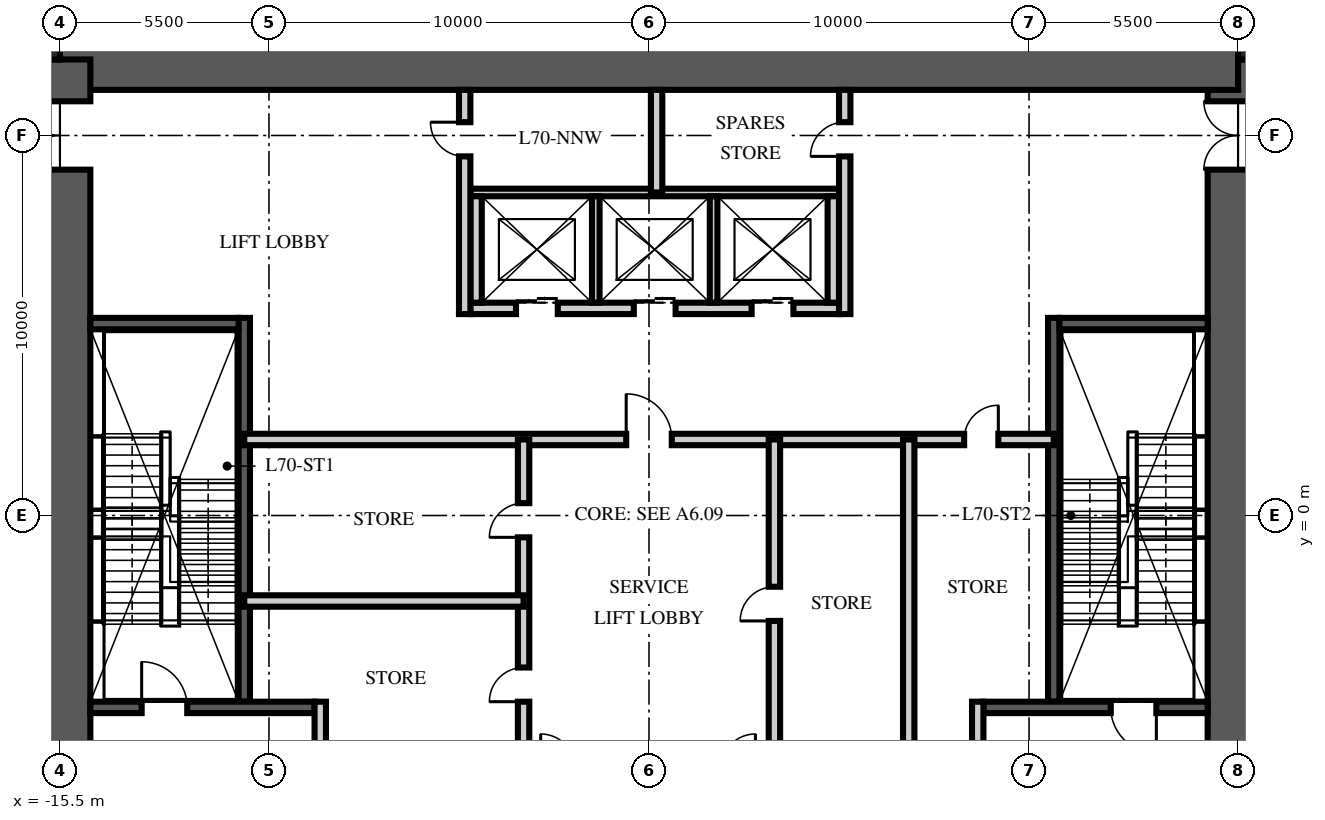
"""IFC4 building model, lengths in metres.
Left out: names, types, materials, properties, quantities, classifications, styles, units other than length and angle.
Written with IfcOpenShell. Run it as: python <this file> out.ifc"""

import sys

from ifc_helpers import new_model, si_unit, direction, frame, frame_2d, origin, origin_2d, place, context, subcontext, project, spatial, rectangle, extrude, element, fill, save


model = new_model("IFC4")
c1 = context("Model", 3, precision=1e-05, world=origin(), true_north=direction((0.0, 1.0)))
c2 = subcontext(c1, "Body", "Model", "MODEL_VIEW")
j1 = project(units=[si_unit("LENGTHUNIT", "METRE"), si_unit("PLANEANGLEUNIT", "RADIAN")], contexts=[c1])
p1 = place(None, origin())
s1 = spatial("IfcSite", under=j1, at=p1, CompositionType="ELEMENT")
p2 = place(p1, origin())
s2 = spatial("IfcBuilding", under=s1, at=p2, CompositionType="ELEMENT")
p3 = place(p2, frame((0.0, 0.0, 278.25)))
s3 = spatial("IfcBuildingStorey", under=s2, at=p3, CompositionType="ELEMENT", Elevation=278.25)
p4 = place(p3, frame((15.5, -12.0, -0.35), z_axis=(0.0, 0.0, 1.0), x_axis=(0.0, 1.0, 0.0)))
e1 = element("IfcWall", 1, at=p4, inside=s3, PredefinedType="SHEAR", context=c2, shape_type="SweptSolid", body=[
    extrude(rectangle(XDim=24.0, YDim=1.6, at=frame_2d((12.0, 0.0))), origin(), (0.0, 0.0, 1.0), 7.6),
])
p5 = place(p4, frame((1.7, 0.0, 0.35)))
e2 = element("IfcOpeningElement", 2, at=p5, cuts=e1, PredefinedType="OPENING", context=c2, shape_type="SweptSolid", body=[
    extrude(rectangle(XDim=1.2, YDim=2.1, at=frame_2d((0.6, 1.05))), frame((0.0, 0.81, 0.0), z_axis=(0.0, -1.0, 0.0), x_axis=(1.0, 0.0, 0.0)), (0.0, 0.0, 1.0), 1.62),
])
p6 = place(p4, frame((21.1, 0.0, 0.35)))
e3 = element("IfcOpeningElement", 3, at=p6, cuts=e1, PredefinedType="OPENING", context=c2, shape_type="SweptSolid", body=[
    extrude(rectangle(XDim=1.8, YDim=2.1, at=frame_2d((0.9, 1.05))), frame((0.0, 0.81, 0.0), z_axis=(0.0, -1.0, 0.0), x_axis=(1.0, 0.0, 0.0)), (0.0, 0.0, 1.0), 1.62),
])
p7 = place(p3, frame((-15.5, 12.0, -0.35), z_axis=(0.0, 0.0, 1.0), x_axis=(1.0, 0.0, 0.0)))
e4 = element("IfcWall", 4, at=p7, inside=s3, PredefinedType="SHEAR", context=c2, shape_type="SweptSolid", body=[
    extrude(rectangle(XDim=31.0, YDim=1.6, at=frame_2d((15.5, 0.0))), origin(), (0.0, 0.0, 1.0), 7.6),
])
p8 = place(p3, frame((-15.5, -12.0, -0.35), z_axis=(0.0, 0.0, 1.0), x_axis=(0.0, 1.0, 0.0)))
e5 = element("IfcWall", 5, at=p8, inside=s3, PredefinedType="SHEAR", context=c2, shape_type="SweptSolid", body=[
    extrude(rectangle(XDim=24.0, YDim=1.6, at=frame_2d((12.0, 0.0))), origin(), (0.0, 0.0, 1.0), 7.6),
])
p9 = place(p8, frame((1.7, 0.0, 0.35)))
e6 = element("IfcOpeningElement", 6, at=p9, cuts=e5, PredefinedType="OPENING", context=c2, shape_type="SweptSolid", body=[
    extrude(rectangle(XDim=1.2, YDim=2.1, at=frame_2d((0.6, 1.05))), frame((0.0, 0.81, 0.0), z_axis=(0.0, -1.0, 0.0), x_axis=(1.0, 0.0, 0.0)), (0.0, 0.0, 1.0), 1.62),
])
p10 = place(p8, frame((21.1, 0.0, 0.35)))
e7 = element("IfcOpeningElement", 7, at=p10, cuts=e5, PredefinedType="OPENING", context=c2, shape_type="SweptSolid", body=[
    extrude(rectangle(XDim=1.8, YDim=2.1, at=frame_2d((0.9, 1.05))), frame((0.0, 0.81, 0.0), z_axis=(0.0, -1.0, 0.0), x_axis=(1.0, 0.0, 0.0)), (0.0, 0.0, 1.0), 1.62),
])
for number, where, z_axis, x_axis in (
    (8, (15.9, 12.4, -0.35), (0.0, 0.0, 1.0), (1.0, 0.0, 0.0)),
    (9, (-15.9, 12.4, -0.35), (0.0, 0.0, 1.0), (1.0, 0.0, 0.0)),
):
    element("IfcColumn", number, at=place(p3, frame(where, z_axis=z_axis, x_axis=x_axis)), inside=s3, PredefinedType="COLUMN", context=c2, shape_type="SweptSolid", body=[
        extrude(rectangle(XDim=0.8, YDim=0.8, at=origin_2d()), origin(), (0.0, 0.0, 1.0), 7.6),
    ])
p11 = place(p3, frame((-10.65, -4.9, 0.0), z_axis=(0.0, 0.0, 1.0), x_axis=(0.0, 1.0, 0.0)))
e10 = element("IfcWall", 10, at=p11, inside=s3, PredefinedType="SOLIDWALL", context=c2, shape_type="SweptSolid", body=[
    extrude(rectangle(XDim=10.1, YDim=0.3, at=frame_2d((5.05, 0.0))), origin(), (0.0, 0.0, 1.0), 7.25),
])
p12 = place(p3, frame((-14.7, -5.05, 0.0), z_axis=(0.0, 0.0, 1.0), x_axis=(1.0, 0.0, 0.0)))
e11 = element("IfcWall", 11, at=p12, inside=s3, PredefinedType="SOLIDWALL", context=c2, shape_type="SweptSolid", body=[
    extrude(rectangle(XDim=5.9, YDim=0.3, at=frame_2d((2.95, 0.0))), origin(), (0.0, 0.0, 1.0), 7.25),
])
p13 = place(p12, frame((1.35, 0.0, 0.0)))
e12 = element("IfcOpeningElement", 12, at=p13, cuts=e11, PredefinedType="OPENING", context=c2, shape_type="SweptSolid", body=[
    extrude(rectangle(XDim=1.2, YDim=2.1, at=frame_2d((0.6, 1.05))), frame((0.0, 0.16, 0.0), z_axis=(0.0, -1.0, 0.0), x_axis=(1.0, 0.0, 0.0)), (0.0, 0.0, 1.0), 0.32),
])
p14 = place(p3, frame((-14.7, 5.05, 0.0), z_axis=(0.0, 0.0, 1.0), x_axis=(1.0, 0.0, 0.0)))
e13 = element("IfcWall", 13, at=p14, inside=s3, PredefinedType="SOLIDWALL", context=c2, shape_type="SweptSolid", body=[
    extrude(rectangle(XDim=3.9, YDim=0.3, at=frame_2d((1.95, 0.0))), origin(), (0.0, 0.0, 1.0), 7.25),
])
p15 = place(p3, frame((-8.65, -11.2, 0.0), z_axis=(0.0, 0.0, 1.0), x_axis=(0.0, 1.0, 0.0)))
e14 = element("IfcWall", 14, at=p15, inside=s3, PredefinedType="PARTITIONING", context=c2, shape_type="SweptSolid", body=[
    extrude(rectangle(XDim=6.3, YDim=0.3, at=frame_2d((3.15, 0.0))), origin(), (0.0, 0.0, 1.0), 7.25),
])
p16 = place(p15, frame((2.45, 0.0, 0.0)))
e15 = element("IfcOpeningElement", 15, at=p16, cuts=e14, PredefinedType="OPENING", context=c2, shape_type="SweptSolid", body=[
    extrude(rectangle(XDim=1.1, YDim=2.1, at=frame_2d((0.55, 1.05))), frame((0.0, 0.16, 0.0), z_axis=(0.0, -1.0, 0.0), x_axis=(1.0, 0.0, 0.0)), (0.0, 0.0, 1.0), 0.32),
])
p17 = place(p3, frame((10.65, -4.9, 0.0), z_axis=(0.0, 0.0, 1.0), x_axis=(0.0, 1.0, 0.0)))
e16 = element("IfcWall", 16, at=p17, inside=s3, PredefinedType="SOLIDWALL", context=c2, shape_type="SweptSolid", body=[
    extrude(rectangle(XDim=10.1, YDim=0.3, at=frame_2d((5.05, 0.0))), origin(), (0.0, 0.0, 1.0), 7.25),
])
p18 = place(p3, frame((14.7, -5.05, 0.0), z_axis=(0.0, 0.0, 1.0), x_axis=(-1.0, 0.0, 0.0)))
e17 = element("IfcWall", 17, at=p18, inside=s3, PredefinedType="SOLIDWALL", context=c2, shape_type="SweptSolid", body=[
    extrude(rectangle(XDim=5.9, YDim=0.3, at=frame_2d((2.95, 0.0))), origin(), (0.0, 0.0, 1.0), 7.25),
])
p19 = place(p18, frame((1.35, 0.0, 0.0)))
e18 = element("IfcOpeningElement", 18, at=p19, cuts=e17, PredefinedType="OPENING", context=c2, shape_type="SweptSolid", body=[
    extrude(rectangle(XDim=1.2, YDim=2.1, at=frame_2d((0.6, 1.05))), frame((0.0, 0.16, 0.0), z_axis=(0.0, -1.0, 0.0), x_axis=(1.0, 0.0, 0.0)), (0.0, 0.0, 1.0), 0.32),
])
p20 = place(p3, frame((14.7, 5.05, 0.0), z_axis=(0.0, 0.0, 1.0), x_axis=(-1.0, 0.0, 0.0)))
e19 = element("IfcWall", 19, at=p20, inside=s3, PredefinedType="SOLIDWALL", context=c2, shape_type="SweptSolid", body=[
    extrude(rectangle(XDim=3.9, YDim=0.3, at=frame_2d((1.95, 0.0))), origin(), (0.0, 0.0, 1.0), 7.25),
])
p21 = place(p3, frame((8.65, -11.2, 0.0), z_axis=(0.0, 0.0, 1.0), x_axis=(0.0, 1.0, 0.0)))
e20 = element("IfcWall", 20, at=p21, inside=s3, PredefinedType="PARTITIONING", context=c2, shape_type="SweptSolid", body=[
    extrude(rectangle(XDim=6.3, YDim=0.3, at=frame_2d((3.15, 0.0))), origin(), (0.0, 0.0, 1.0), 7.25),
])
p22 = place(p21, frame((2.45, 0.0, 0.0)))
e21 = element("IfcOpeningElement", 21, at=p22, cuts=e20, PredefinedType="OPENING", context=c2, shape_type="SweptSolid", body=[
    extrude(rectangle(XDim=1.1, YDim=2.1, at=frame_2d((0.55, 1.05))), frame((0.0, 0.16, 0.0), z_axis=(0.0, -1.0, 0.0), x_axis=(1.0, 0.0, 0.0)), (0.0, 0.0, 1.0), 0.32),
])
p23 = place(p3, frame((-4.7, 5.45, 0.0), z_axis=(0.0, 0.0, 1.0), x_axis=(1.0, 0.0, 0.0)))
e22 = element("IfcWall", 22, at=p23, inside=s3, PredefinedType="PARTITIONING", context=c2, shape_type="SweptSolid", body=[
    extrude(rectangle(XDim=9.7, YDim=0.3, at=frame_2d((4.85, 0.0))), origin(), (0.0, 0.0, 1.0), 7.25),
])
p24 = place(p23, frame((1.2, 0.0, 0.0)))
e23 = element("IfcOpeningElement", 23, at=p24, cuts=e22, PredefinedType="OPENING", context=c2, shape_type="SweptSolid", body=[
    extrude(rectangle(XDim=1.1, YDim=2.1, at=frame_2d((0.55, 1.05))), frame((0.0, 0.16, 0.0), z_axis=(0.0, -1.0, 0.0), x_axis=(1.0, 0.0, 0.0)), (0.0, 0.0, 1.0), 0.32),
])
p25 = place(p23, frame((4.3, 0.0, 0.0)))
e24 = element("IfcOpeningElement", 24, at=p25, cuts=e22, PredefinedType="OPENING", context=c2, shape_type="SweptSolid", body=[
    extrude(rectangle(XDim=1.1, YDim=2.1, at=frame_2d((0.55, 1.05))), frame((0.0, 0.16, 0.0), z_axis=(0.0, -1.0, 0.0), x_axis=(1.0, 0.0, 0.0)), (0.0, 0.0, 1.0), 0.32),
])
p26 = place(p23, frame((7.4, 0.0, 0.0)))
e25 = element("IfcOpeningElement", 25, at=p26, cuts=e22, PredefinedType="OPENING", context=c2, shape_type="SweptSolid", body=[
    extrude(rectangle(XDim=1.1, YDim=2.1, at=frame_2d((0.55, 1.05))), frame((0.0, 0.16, 0.0), z_axis=(0.0, -1.0, 0.0), x_axis=(1.0, 0.0, 0.0)), (0.0, 0.0, 1.0), 0.32),
])
p27 = place(p3, frame((-4.7, 8.5, 0.0), z_axis=(0.0, 0.0, 1.0), x_axis=(1.0, 0.0, 0.0)))
e26 = element("IfcWall", 26, at=p27, inside=s3, PredefinedType="PARTITIONING", context=c2, shape_type="SweptSolid", body=[
    extrude(rectangle(XDim=9.7, YDim=0.2, at=frame_2d((4.85, 0.0))), origin(), (0.0, 0.0, 1.0), 7.25),
])
for number, where, z_axis, x_axis in (
    (27, (-4.55, 5.6, 0.0), (0.0, 0.0, 1.0), (0.0, 1.0, 0.0)),
    (28, (4.85, 5.6, 0.0), (0.0, 0.0, 1.0), (0.0, 1.0, 0.0)),
):
    element("IfcWall", number, at=place(p3, frame(where, z_axis=z_axis, x_axis=x_axis)), inside=s3, PredefinedType="PARTITIONING", context=c2, shape_type="SweptSolid", body=[
        extrude(rectangle(XDim=2.8, YDim=0.3, at=frame_2d((1.4, 0.0))), origin(), (0.0, 0.0, 1.0), 7.25),
    ])
for number, where, z_axis, x_axis in (
    (29, (-1.4, 5.6, 0.0), (0.0, 0.0, 1.0), (0.0, 1.0, 0.0)),
    (30, (1.7, 5.6, 0.0), (0.0, 0.0, 1.0), (0.0, 1.0, 0.0)),
):
    element("IfcWall", number, at=place(p3, frame(where, z_axis=z_axis, x_axis=x_axis)), inside=s3, PredefinedType="PARTITIONING", context=c2, shape_type="SweptSolid", body=[
        extrude(rectangle(XDim=2.8, YDim=0.2, at=frame_2d((1.4, 0.0))), origin(), (0.0, 0.0, 1.0), 7.25),
    ])
p28 = place(p3, frame((-10.65, 2.0, 0.0), z_axis=(0.0, 0.0, 1.0), x_axis=(1.0, 0.0, 0.0)))
e31 = element("IfcWall", 31, at=p28, inside=s3, PredefinedType="PARTITIONING", context=c2, shape_type="SweptSolid", body=[
    extrude(rectangle(XDim=21.3, YDim=0.3, at=frame_2d((10.65, 0.0))), origin(), (0.0, 0.0, 1.0), 7.25),
])
p29 = place(p28, frame((10.05, 0.0, 0.0)))
e32 = element("IfcOpeningElement", 32, at=p29, cuts=e31, PredefinedType="OPENING", context=c2, shape_type="SweptSolid", body=[
    extrude(rectangle(XDim=1.2, YDim=2.1, at=frame_2d((0.6, 1.05))), frame((0.0, 0.16, 0.0), z_axis=(0.0, -1.0, 0.0), x_axis=(1.0, 0.0, 0.0)), (0.0, 0.0, 1.0), 0.32),
])
p30 = place(p28, frame((18.942, 0.0, 0.0)))
e33 = element("IfcOpeningElement", 33, at=p30, cuts=e31, PredefinedType="OPENING", context=c2, shape_type="SweptSolid", body=[
    extrude(rectangle(XDim=0.9, YDim=2.1, at=frame_2d((0.45, 1.05))), frame((0.0, 0.16, 0.0), z_axis=(0.0, -1.0, 0.0), x_axis=(1.0, 0.0, 0.0)), (0.0, 0.0, 1.0), 0.32),
])
p31 = place(p3, frame((-3.3, -6.65, 0.0), z_axis=(0.0, 0.0, 1.0), x_axis=(0.0, 1.0, 0.0)))
e34 = element("IfcWall", 34, at=p31, inside=s3, PredefinedType="PARTITIONING", context=c2, shape_type="SweptSolid", body=[
    extrude(rectangle(XDim=8.65, YDim=0.3, at=frame_2d((4.325, 0.0))), origin(), (0.0, 0.0, 1.0), 7.25),
])
p32 = place(p31, frame((1.75, 0.0, 0.0)))
e35 = element("IfcOpeningElement", 35, at=p32, cuts=e34, PredefinedType="OPENING", context=c2, shape_type="SweptSolid", body=[
    extrude(rectangle(XDim=0.9, YDim=2.1, at=frame_2d((0.45, 1.05))), frame((0.0, 0.16, 0.0), z_axis=(0.0, -1.0, 0.0), x_axis=(1.0, 0.0, 0.0)), (0.0, 0.0, 1.0), 0.32),
])
p33 = place(p31, frame((6.075, 0.0, 0.0)))
e36 = element("IfcOpeningElement", 36, at=p33, cuts=e34, PredefinedType="OPENING", context=c2, shape_type="SweptSolid", body=[
    extrude(rectangle(XDim=0.9, YDim=2.1, at=frame_2d((0.45, 1.05))), frame((0.0, 0.16, 0.0), z_axis=(0.0, -1.0, 0.0), x_axis=(1.0, 0.0, 0.0)), (0.0, 0.0, 1.0), 0.32),
])
p34 = place(p3, frame((3.3, -6.65, 0.0), z_axis=(0.0, 0.0, 1.0), x_axis=(0.0, 1.0, 0.0)))
e37 = element("IfcWall", 37, at=p34, inside=s3, PredefinedType="PARTITIONING", context=c2, shape_type="SweptSolid", body=[
    extrude(rectangle(XDim=8.65, YDim=0.3, at=frame_2d((4.325, 0.0))), origin(), (0.0, 0.0, 1.0), 7.25),
])
p35 = place(p34, frame((3.875, 0.0, 0.0)))
e38 = element("IfcOpeningElement", 38, at=p35, cuts=e37, PredefinedType="OPENING", context=c2, shape_type="SweptSolid", body=[
    extrude(rectangle(XDim=0.9, YDim=2.1, at=frame_2d((0.45, 1.05))), frame((0.0, 0.16, 0.0), z_axis=(0.0, -1.0, 0.0), x_axis=(1.0, 0.0, 0.0)), (0.0, 0.0, 1.0), 0.32),
])
p36 = place(p3, frame((-10.65, -2.25, 0.0), z_axis=(0.0, 0.0, 1.0), x_axis=(1.0, 0.0, 0.0)))
e39 = element("IfcWall", 39, at=p36, inside=s3, PredefinedType="PARTITIONING", context=c2, shape_type="SweptSolid", body=[
    extrude(rectangle(XDim=7.35, YDim=0.3, at=frame_2d((3.675, 0.0))), origin(), (0.0, 0.0, 1.0), 7.25),
])
p37 = place(p3, frame((6.834, -6.65, 0.0), z_axis=(0.0, 0.0, 1.0), x_axis=(0.0, 1.0, 0.0)))
e40 = element("IfcWall", 40, at=p37, inside=s3, PredefinedType="PARTITIONING", context=c2, shape_type="SweptSolid", body=[
    extrude(rectangle(XDim=8.65, YDim=0.3, at=frame_2d((4.325, 0.0))), origin(), (0.0, 0.0, 1.0), 7.25),
])
p38 = place(p3, frame((-4.85, 5.3, 0.0), z_axis=(0.0, 0.0, 1.0), x_axis=(0.0, 1.0, 0.0)))
e41 = element("IfcWall", 41, at=p38, inside=s3, PredefinedType="PARTITIONING", context=c2, shape_type="SweptSolid", body=[
    extrude(rectangle(XDim=5.9, YDim=0.3, at=frame_2d((2.95, 0.0))), origin(), (0.0, 0.0, 1.0), 7.25),
])
p39 = place(p38, frame((4.15, 0.0, 0.0)))
e42 = element("IfcOpeningElement", 42, at=p39, cuts=e41, PredefinedType="OPENING", context=c2, shape_type="SweptSolid", body=[
    extrude(rectangle(XDim=0.9, YDim=2.1, at=frame_2d((0.45, 1.05))), frame((0.0, 0.16, 0.0), z_axis=(0.0, -1.0, 0.0), x_axis=(1.0, 0.0, 0.0)), (0.0, 0.0, 1.0), 0.32),
])
p40 = place(p3, frame((5.15, 5.3, 0.0), z_axis=(0.0, 0.0, 1.0), x_axis=(0.0, 1.0, 0.0)))
e43 = element("IfcWall", 43, at=p40, inside=s3, PredefinedType="PARTITIONING", context=c2, shape_type="SweptSolid", body=[
    extrude(rectangle(XDim=5.9, YDim=0.3, at=frame_2d((2.95, 0.0))), origin(), (0.0, 0.0, 1.0), 7.25),
])
p41 = place(p40, frame((4.15, 0.0, 0.0)))
e44 = element("IfcOpeningElement", 44, at=p41, cuts=e43, PredefinedType="OPENING", context=c2, shape_type="SweptSolid", body=[
    extrude(rectangle(XDim=0.9, YDim=2.1, at=frame_2d((0.45, 1.05))), frame((0.0, 0.16, 0.0), z_axis=(0.0, -1.0, 0.0), x_axis=(1.0, 0.0, 0.0)), (0.0, 0.0, 1.0), 0.32),
])
p42 = place(p3, frame((0.2, 8.5, 0.0), z_axis=(0.0, 0.0, 1.0), x_axis=(0.0, 1.0, 0.0)))
e45 = element("IfcWall", 45, at=p42, inside=s3, PredefinedType="PARTITIONING", context=c2, shape_type="SweptSolid", body=[
    extrude(rectangle(XDim=2.7, YDim=0.3, at=frame_2d((1.35, 0.0))), origin(), (0.0, 0.0, 1.0), 7.25),
])
p43 = place(p13, origin())
e46 = element("IfcDoor", 46, at=p43, inside=s3, OperationType="SINGLE_SWING_LEFT", PredefinedType="DOOR", context=c2, shape_type="SweptSolid", body=[
    extrude(rectangle(XDim=1.2, YDim=2.1, at=frame_2d((0.6, 1.05))), frame((0.0, 0.025, 0.0), z_axis=(0.0, -1.0, 0.0), x_axis=(1.0, 0.0, 0.0)), (0.0, 0.0, 1.0), 0.05),
])
fill(e12, e46)
p44 = place(p10, origin())
e47 = element("IfcDoor", 47, at=p44, inside=s3, OperationType="DOUBLE_DOOR_SINGLE_SWING", PredefinedType="DOOR", context=c2, shape_type="SweptSolid", body=[
    extrude(rectangle(XDim=1.8, YDim=2.1, at=frame_2d((0.9, 1.05))), frame((0.0, 0.025, 0.0), z_axis=(0.0, -1.0, 0.0), x_axis=(1.0, 0.0, 0.0)), (0.0, 0.0, 1.0), 0.05),
])
fill(e7, e47)
p45 = place(p19, origin())
e48 = element("IfcDoor", 48, at=p45, inside=s3, OperationType="SINGLE_SWING_LEFT", PredefinedType="DOOR", context=c2, shape_type="SweptSolid", body=[
    extrude(rectangle(XDim=1.2, YDim=2.1, at=frame_2d((0.6, 1.05))), frame((0.0, 0.025, 0.0), z_axis=(0.0, -1.0, 0.0), x_axis=(1.0, 0.0, 0.0)), (0.0, 0.0, 1.0), 0.05),
])
fill(e18, e48)
p46 = place(p6, origin())
e49 = element("IfcDoor", 49, at=p46, inside=s3, OperationType="DOUBLE_DOOR_SINGLE_SWING", PredefinedType="DOOR", context=c2, shape_type="SweptSolid", body=[
    extrude(rectangle(XDim=1.8, YDim=2.1, at=frame_2d((0.9, 1.05))), frame((0.0, 0.025, 0.0), z_axis=(0.0, -1.0, 0.0), x_axis=(1.0, 0.0, 0.0)), (0.0, 0.0, 1.0), 0.05),
])
fill(e3, e49)
p47 = place(p24, origin())
e50 = element("IfcDoor", 50, at=p47, inside=s3, OperationType="DOUBLE_DOOR_SLIDING", PredefinedType="DOOR", context=c2, shape_type="SweptSolid", body=[
    extrude(rectangle(XDim=1.1, YDim=2.1, at=frame_2d((0.55, 1.05))), frame((0.0, 0.025, 0.0), z_axis=(0.0, -1.0, 0.0), x_axis=(1.0, 0.0, 0.0)), (0.0, 0.0, 1.0), 0.05),
])
fill(e23, e50)
p48 = place(p25, origin())
e51 = element("IfcDoor", 51, at=p48, inside=s3, OperationType="DOUBLE_DOOR_SLIDING", PredefinedType="DOOR", context=c2, shape_type="SweptSolid", body=[
    extrude(rectangle(XDim=1.1, YDim=2.1, at=frame_2d((0.55, 1.05))), frame((0.0, 0.025, 0.0), z_axis=(0.0, -1.0, 0.0), x_axis=(1.0, 0.0, 0.0)), (0.0, 0.0, 1.0), 0.05),
])
fill(e24, e51)
p49 = place(p26, origin())
e52 = element("IfcDoor", 52, at=p49, inside=s3, OperationType="DOUBLE_DOOR_SLIDING", PredefinedType="DOOR", context=c2, shape_type="SweptSolid", body=[
    extrude(rectangle(XDim=1.1, YDim=2.1, at=frame_2d((0.55, 1.05))), frame((0.0, 0.025, 0.0), z_axis=(0.0, -1.0, 0.0), x_axis=(1.0, 0.0, 0.0)), (0.0, 0.0, 1.0), 0.05),
])
fill(e25, e52)
p50 = place(p29, origin())
e53 = element("IfcDoor", 53, at=p50, inside=s3, OperationType="SINGLE_SWING_LEFT", PredefinedType="DOOR", context=c2, shape_type="SweptSolid", body=[
    extrude(rectangle(XDim=1.2, YDim=2.1, at=frame_2d((0.6, 1.05))), frame((0.0, 0.025, 0.0), z_axis=(0.0, -1.0, 0.0), x_axis=(1.0, 0.0, 0.0)), (0.0, 0.0, 1.0), 0.05),
])
fill(e32, e53)
p51 = place(p32, origin())
e54 = element("IfcDoor", 54, at=p51, inside=s3, OperationType="SINGLE_SWING_LEFT", PredefinedType="DOOR", context=c2, shape_type="SweptSolid", body=[
    extrude(rectangle(XDim=0.9, YDim=2.1, at=frame_2d((0.45, 1.05))), frame((0.0, 0.025, 0.0), z_axis=(0.0, -1.0, 0.0), x_axis=(1.0, 0.0, 0.0)), (0.0, 0.0, 1.0), 0.05),
])
fill(e35, e54)
p52 = place(p33, origin())
e55 = element("IfcDoor", 55, at=p52, inside=s3, OperationType="SINGLE_SWING_LEFT", PredefinedType="DOOR", context=c2, shape_type="SweptSolid", body=[
    extrude(rectangle(XDim=0.9, YDim=2.1, at=frame_2d((0.45, 1.05))), frame((0.0, 0.025, 0.0), z_axis=(0.0, -1.0, 0.0), x_axis=(1.0, 0.0, 0.0)), (0.0, 0.0, 1.0), 0.05),
])
fill(e36, e55)
p53 = place(p35, origin())
e56 = element("IfcDoor", 56, at=p53, inside=s3, OperationType="SINGLE_SWING_LEFT", PredefinedType="DOOR", context=c2, shape_type="SweptSolid", body=[
    extrude(rectangle(XDim=0.9, YDim=2.1, at=frame_2d((0.45, 1.05))), frame((0.0, 0.025, 0.0), z_axis=(0.0, -1.0, 0.0), x_axis=(1.0, 0.0, 0.0)), (0.0, 0.0, 1.0), 0.05),
])
fill(e38, e56)
p54 = place(p30, origin())
e57 = element("IfcDoor", 57, at=p54, inside=s3, OperationType="SINGLE_SWING_RIGHT", PredefinedType="DOOR", context=c2, shape_type="SweptSolid", body=[
    extrude(rectangle(XDim=0.9, YDim=2.1, at=frame_2d((0.45, 1.05))), frame((0.0, 0.025, 0.0), z_axis=(0.0, -1.0, 0.0), x_axis=(1.0, 0.0, 0.0)), (0.0, 0.0, 1.0), 0.05),
])
fill(e33, e57)
p55 = place(p39, origin())
e58 = element("IfcDoor", 58, at=p55, inside=s3, OperationType="SINGLE_SWING_RIGHT", PredefinedType="DOOR", context=c2, shape_type="SweptSolid", body=[
    extrude(rectangle(XDim=0.9, YDim=2.1, at=frame_2d((0.45, 1.05))), frame((0.0, 0.025, 0.0), z_axis=(0.0, -1.0, 0.0), x_axis=(1.0, 0.0, 0.0)), (0.0, 0.0, 1.0), 0.05),
])
fill(e42, e58)
p56 = place(p41, origin())
e59 = element("IfcDoor", 59, at=p56, inside=s3, OperationType="SINGLE_SWING_LEFT", PredefinedType="DOOR", context=c2, shape_type="SweptSolid", body=[
    extrude(rectangle(XDim=0.9, YDim=2.1, at=frame_2d((0.45, 1.05))), frame((0.0, 0.025, 0.0), z_axis=(0.0, -1.0, 0.0), x_axis=(1.0, 0.0, 0.0)), (0.0, 0.0, 1.0), 0.05),
])
fill(e44, e59)
save(model, sys.argv[1])
